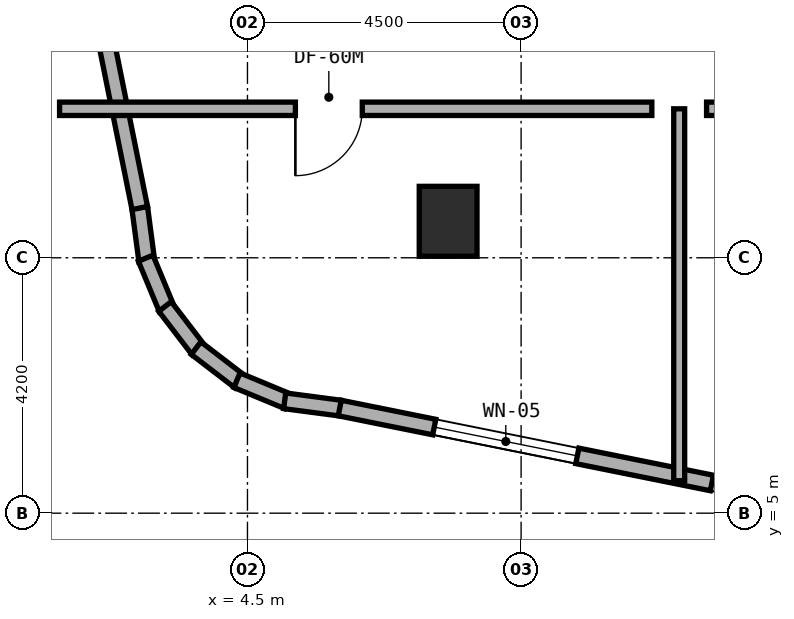
"""IFC4 building model, lengths in metres.
Left out: names, types, materials, properties, quantities, classifications, styles, units other than length and angle.
Written with IfcOpenShell. Run it as: python <this file> out.ifc"""

import sys

from ifc_helpers import new_model, si_unit, direction, frame, frame_2d, origin, origin_2d, place, context, subcontext, project, spatial, rectangle, extrude, element, fill, save


model = new_model("IFC4")
c1 = context("Model", 3, precision=1e-05, world=origin(), true_north=direction((0.0, 1.0)))
c2 = subcontext(c1, "Body", "Model", "MODEL_VIEW")
j1 = project(units=[si_unit("LENGTHUNIT", "METRE"), si_unit("PLANEANGLEUNIT", "RADIAN")], contexts=[c1])
p1 = place(None, origin())
s1 = spatial("IfcSite", under=j1, at=p1, CompositionType="ELEMENT")
p2 = place(p1, origin())
s2 = spatial("IfcBuilding", under=s1, at=p2, CompositionType="ELEMENT")
p3 = place(p2, frame((0.0, 0.0, 112.5)))
s3 = spatial("IfcBuildingStorey", under=s2, at=p3, CompositionType="ELEMENT", Elevation=112.5)
p4 = place(p3, frame((7.8, 9.8, 0.0), z_axis=(0.0, 0.0, 1.0), x_axis=(1.0, 0.0, 0.0)))
e1 = element("IfcColumn", 1, at=p4, inside=s3, PredefinedType="COLUMN", context=c2, shape_type="SweptSolid", body=[
    extrude(rectangle(XDim=0.95, YDim=1.15, at=origin_2d()), origin(), (0.0, 0.0, 1.0), 3.5),
])
p5 = place(p3, frame((2.728, 10.025, 0.0), z_axis=(0.0, 0.0, 1.0), x_axis=(0.130953706898, -0.991388484223, 0.0)))
e2 = element("IfcWall", 2, at=p5, inside=s3, PredefinedType="STANDARD", context=c2, shape_type="SweptSolid", body=[
    extrude(rectangle(XDim=0.885, YDim=0.26, at=frame_2d((0.443, 0.0))), origin(), (0.0, 0.0, 1.0), 3.22),
])
p6 = place(p3, frame((2.826, 9.193, 0.0), z_axis=(0.0, 0.0, 1.0), x_axis=(0.383290660547, -0.923627776508, 0.0)))
e3 = element("IfcWall", 3, at=p6, inside=s3, PredefinedType="STANDARD", context=c2, shape_type="SweptSolid", body=[
    extrude(rectangle(XDim=0.903, YDim=0.26, at=frame_2d((0.452, 0.0))), origin(), (0.0, 0.0, 1.0), 3.22),
])
p7 = place(p3, frame((3.144, 8.399, 0.0), z_axis=(0.0, 0.0, 1.0), x_axis=(0.608624690463, -0.793458244748, 0.0)))
e4 = element("IfcWall", 4, at=p7, inside=s3, PredefinedType="STANDARD", context=c2, shape_type="SweptSolid", body=[
    extrude(rectangle(XDim=0.902, YDim=0.26, at=frame_2d((0.451, 0.0))), origin(), (0.0, 0.0, 1.0), 3.22),
])
p8 = place(p3, frame((3.655, 7.714, 0.0), z_axis=(0.0, 0.0, 1.0), x_axis=(0.793558456666, -0.608494022858, 0.0)))
e5 = element("IfcWall", 5, at=p8, inside=s3, PredefinedType="STANDARD", context=c2, shape_type="SweptSolid", body=[
    extrude(rectangle(XDim=0.902, YDim=0.26, at=frame_2d((0.451, 0.0))), origin(), (0.0, 0.0, 1.0), 3.22),
])
p9 = place(p3, frame((4.327, 7.186, 0.0), z_axis=(0.0, 0.0, 1.0), x_axis=(0.923683767999, -0.383155708213, 0.0)))
e6 = element("IfcWall", 6, at=p9, inside=s3, PredefinedType="STANDARD", context=c2, shape_type="SweptSolid", body=[
    extrude(rectangle(XDim=0.903, YDim=0.26, at=frame_2d((0.451, 0.0))), origin(), (0.0, 0.0, 1.0), 3.22),
])
p10 = place(p3, frame((5.112, 6.848, 0.0), z_axis=(0.0, 0.0, 1.0), x_axis=(0.991487658083, -0.130200706103, 0.0)))
e7 = element("IfcWall", 7, at=p10, inside=s3, PredefinedType="STANDARD", context=c2, shape_type="SweptSolid", body=[
    extrude(rectangle(XDim=0.921, YDim=0.26, at=frame_2d((0.46, 0.0))), origin(), (0.0, 0.0, 1.0), 3.22),
])
p11 = place(p3, frame((6.018, 6.729, 0.0), z_axis=(0.0, 0.0, 1.0), x_axis=(0.980317172899, -0.197429077186, 0.0)))
e8 = element("IfcWall", 8, at=p11, inside=s3, PredefinedType="STANDARD", context=c2, shape_type="SweptSolid", body=[
    extrude(rectangle(XDim=9.117, YDim=0.26, at=frame_2d((4.559, 0.0))), origin(), (0.0, 0.0, 1.0), 3.22),
])
p12 = place(p11, frame((1.585, 0.0, 0.8)))
e9 = element("IfcOpeningElement", 9, at=p12, cuts=e8, PredefinedType="OPENING", context=c2, shape_type="SweptSolid", body=[
    extrude(rectangle(XDim=2.4, YDim=1.6, at=frame_2d((1.2, 0.8))), frame((0.0, 0.14, 0.0), z_axis=(0.0, -1.0, 0.0), x_axis=(1.0, 0.0, 0.0)), (0.0, 0.0, 1.0), 0.28),
])
p13 = place(p11, frame((6.243, 0.0, 0.8)))
e10 = element("IfcOpeningElement", 10, at=p13, cuts=e8, PredefinedType="OPENING", context=c2, shape_type="SweptSolid", body=[
    extrude(rectangle(XDim=2.4, YDim=1.6, at=frame_2d((1.2, 0.8))), frame((0.0, 0.14, 0.0), z_axis=(0.0, -1.0, 0.0), x_axis=(1.0, 0.0, 0.0)), (0.0, 0.0, 1.0), 0.28),
])
p14 = place(p3, frame((0.916, 19.02, 0.0), z_axis=(0.0, 0.0, 1.0), x_axis=(0.197435082048, -0.980315963543, 0.0)))
e11 = element("IfcWall", 11, at=p14, inside=s3, PredefinedType="STANDARD", context=c2, shape_type="SweptSolid", body=[
    extrude(rectangle(XDim=9.183, YDim=0.26, at=frame_2d((4.591, 0.0))), origin(), (0.0, 0.0, 1.0), 3.22),
])
p15 = place(p14, frame((2.497, 0.0, 0.8)))
e12 = element("IfcOpeningElement", 12, at=p15, cuts=e11, PredefinedType="OPENING", context=c2, shape_type="SweptSolid", body=[
    extrude(rectangle(XDim=2.4, YDim=1.6, at=frame_2d((1.2, 0.8))), frame((0.0, 0.14, 0.0), z_axis=(0.0, -1.0, 0.0), x_axis=(1.0, 0.0, 0.0)), (0.0, 0.0, 1.0), 0.28),
])
p16 = place(p3, frame((1.41, 11.65, 0.0), z_axis=(0.0, 0.0, 1.0), x_axis=(1.0, 0.0, 0.0)))
e13 = element("IfcWall", 13, at=p16, inside=s3, PredefinedType="SOLIDWALL", context=c2, shape_type="SweptSolid", body=[
    extrude(rectangle(XDim=9.74, YDim=0.22, at=frame_2d((4.87, 0.0))), origin(), (0.0, 0.0, 1.0), 2.695),
])
p17 = place(p16, frame((3.878, 0.0, 0.0)))
e14 = element("IfcOpeningElement", 14, at=p17, cuts=e13, PredefinedType="OPENING", context=c2, shape_type="SweptSolid", body=[
    extrude(rectangle(XDim=1.1, YDim=2.1, at=frame_2d((0.55, 1.05))), frame((0.0, 0.12, 0.0), z_axis=(0.0, -1.0, 0.0), x_axis=(1.0, 0.0, 0.0)), (0.0, 0.0, 1.0), 0.24),
])
p18 = place(p3, frame((11.6, 5.534, 0.0), z_axis=(0.0, 0.0, 1.0), x_axis=(0.0, 1.0, 0.0)))
e15 = element("IfcWall", 15, at=p18, inside=s3, PredefinedType="SOLIDWALL", context=c2, shape_type="SweptSolid", body=[
    extrude(rectangle(XDim=6.116, YDim=0.18, at=frame_2d((3.058, 0.0))), origin(), (0.0, 0.0, 1.0), 2.835),
])
p19 = place(p3, frame((12.05, 11.65, 0.0), z_axis=(0.0, 0.0, 1.0), x_axis=(1.0, 0.0, 0.0)))
e16 = element("IfcWall", 16, at=p19, inside=s3, PredefinedType="SOLIDWALL", context=c2, shape_type="SweptSolid", body=[
    extrude(rectangle(XDim=13.3, YDim=0.22, at=frame_2d((6.65, 0.0))), origin(), (0.0, 0.0, 1.0), 2.695),
])
p20 = place(p19, frame((5.48, 0.0, 0.0)))
e17 = element("IfcOpeningElement", 17, at=p20, cuts=e16, PredefinedType="OPENING", context=c2, shape_type="SweptSolid", body=[
    extrude(rectangle(XDim=1.1, YDim=2.1, at=frame_2d((0.55, 1.05))), frame((0.0, 0.12, 0.0), z_axis=(0.0, -1.0, 0.0), x_axis=(1.0, 0.0, 0.0)), (0.0, 0.0, 1.0), 0.24),
])
p21 = place(p12, origin())
e18 = element("IfcWindow", 18, at=p21, inside=s3, PartitioningType="SINGLE_PANEL", PredefinedType="WINDOW", context=c2, shape_type="SweptSolid", body=[
    extrude(rectangle(XDim=2.4, YDim=1.6, at=frame_2d((1.2, 0.8))), frame((0.0, 0.03, 0.0), z_axis=(0.0, -1.0, 0.0), x_axis=(1.0, 0.0, 0.0)), (0.0, 0.0, 1.0), 0.06),
])
fill(e9, e18)
p22 = place(p13, origin())
e19 = element("IfcWindow", 19, at=p22, inside=s3, PartitioningType="SINGLE_PANEL", PredefinedType="WINDOW", context=c2, shape_type="SweptSolid", body=[
    extrude(rectangle(XDim=2.4, YDim=1.6, at=frame_2d((1.2, 0.8))), frame((0.0, 0.03, 0.0), z_axis=(0.0, -1.0, 0.0), x_axis=(1.0, 0.0, 0.0)), (0.0, 0.0, 1.0), 0.06),
])
fill(e10, e19)
p23 = place(p17, frame((1.1, 0.0, 0.0), z_axis=(0.0, 0.0, 1.0), x_axis=(-1.0, 0.0, 0.0)))
e20 = element("IfcDoor", 20, at=p23, inside=s3, OperationType="SINGLE_SWING_RIGHT", PredefinedType="DOOR", context=c2, shape_type="SweptSolid", body=[
    extrude(rectangle(XDim=1.1, YDim=2.1, at=frame_2d((0.55, 1.05))), frame((0.0, 0.025, 0.0), z_axis=(0.0, -1.0, 0.0), x_axis=(1.0, 0.0, 0.0)), (0.0, 0.0, 1.0), 0.05),
])
fill(e14, e20)
save(model, sys.argv[1])
